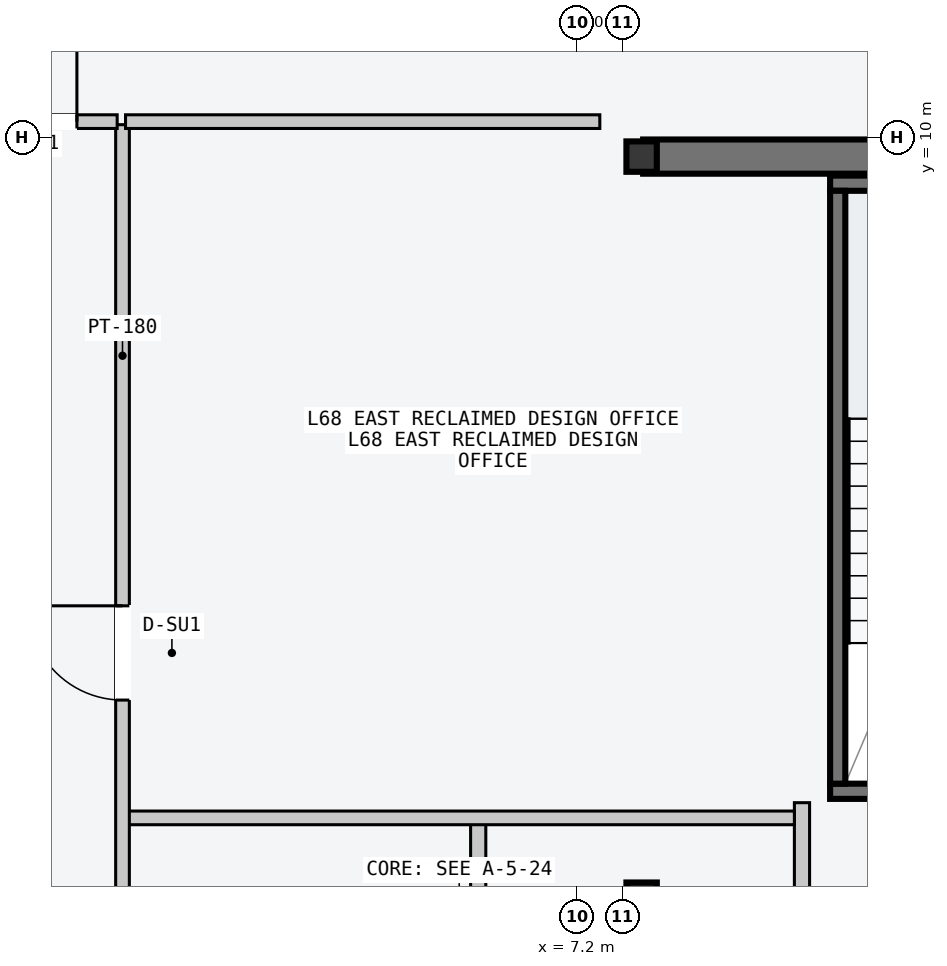
"""IFC4 building model, lengths in metres.
Left out: names, types, materials, properties, quantities, classifications, styles, units other than length and angle.
Written with IfcOpenShell. Run it as: python <this file> out.ifc"""

import sys

from ifc_helpers import new_model, si_unit, direction, frame, frame_2d, origin, origin_2d, place, context, subcontext, project, spatial, rectangle, i_section, extrude, element, fill, save


model = new_model("IFC4")
c1 = context("Model", 3, precision=1e-05, world=origin(), true_north=direction((0.0, 1.0)))
c2 = subcontext(c1, "Body", "Model", "MODEL_VIEW")
j1 = project(units=[si_unit("LENGTHUNIT", "METRE"), si_unit("PLANEANGLEUNIT", "RADIAN")], contexts=[c1])
p1 = place(None, origin())
s1 = spatial("IfcSite", under=j1, at=p1, CompositionType="ELEMENT")
p2 = place(p1, origin())
s2 = spatial("IfcBuilding", under=s1, at=p2, CompositionType="ELEMENT")
p3 = place(p2, frame((0.0, 0.0, 258.0)))
s3 = spatial("IfcBuildingStorey", under=s2, at=p3, CompositionType="ELEMENT", Elevation=258.0)
p4 = place(p3, frame((8.07, 9.75, -0.2), z_axis=(0.0, 0.0, 1.0), x_axis=(1.0, 0.0, 0.0)))
e1 = element("IfcWall", 1, at=p4, inside=s3, PredefinedType="SHEAR", context=c2, shape_type="SweptSolid", body=[
    extrude(rectangle(XDim=6.46, YDim=0.45, at=frame_2d((3.23, 0.0))), origin(), (0.0, 0.0, 1.0), 3.6),
])
p5 = place(p3, frame((10.53, 1.4, -0.2), z_axis=(0.0, 0.0, 1.0), x_axis=(1.0, 0.0, 0.0)))
e2 = element("IfcWall", 2, at=p5, inside=s3, PredefinedType="SOLIDWALL", context=c2, shape_type="SweptSolid", body=[
    extrude(rectangle(XDim=3.72, YDim=0.2, at=frame_2d((1.86, 0.0))), origin(), (0.0, 0.0, 1.0), 3.6),
])
p6 = place(p5, frame((1.5, 0.0, 0.2)))
e3 = element("IfcOpeningElement", 3, at=p6, cuts=e2, PredefinedType="OPENING", context=c2, shape_type="SweptSolid", body=[
    extrude(rectangle(XDim=1.12, YDim=2.18, at=frame_2d((0.56, 1.09))), frame((0.0, 0.11, 0.0), z_axis=(0.0, -1.0, 0.0), x_axis=(1.0, 0.0, 0.0)), (0.0, 0.0, 1.0), 0.22),
])
p7 = place(p3, frame((10.53, 9.4, -0.2), z_axis=(0.0, 0.0, 1.0), x_axis=(1.0, 0.0, 0.0)))
e4 = element("IfcWall", 4, at=p7, inside=s3, PredefinedType="SOLIDWALL", context=c2, shape_type="SweptSolid", body=[
    extrude(rectangle(XDim=3.72, YDim=0.2, at=frame_2d((1.86, 0.0))), origin(), (0.0, 0.0, 1.0), 3.6),
])
p8 = place(p3, frame((10.63, 1.5, -0.2), z_axis=(0.0, 0.0, 1.0), x_axis=(0.0, 1.0, 0.0)))
e5 = element("IfcWall", 5, at=p8, inside=s3, PredefinedType="SOLIDWALL", context=c2, shape_type="SweptSolid", body=[
    extrude(rectangle(XDim=7.8, YDim=0.2, at=frame_2d((3.9, 0.0))), origin(), (0.0, 0.0, 1.0), 3.6),
])
for number, where, z_axis, x_axis in (
    (6, (8.05, 0.0, 0.0), (0.0, 0.0, 1.0), (1.0, 0.0, 0.0)),
    (7, (8.05, 9.75, 0.0), (0.0, 0.0, 1.0), (1.0, 0.0, 0.0)),
):
    element("IfcColumn", number, at=place(p3, frame(where, z_axis=z_axis, x_axis=x_axis)), inside=s3, PredefinedType="COLUMN", context=c2, shape_type="SweptSolid", body=[
        extrude(i_section(OverallWidth=0.4, OverallDepth=0.4, WebThickness=0.013, FlangeThickness=0.021, at=origin_2d()), origin(), (0.0, 0.0, 1.0), 3.6),
    ])
p9 = place(p3, frame((5.9, -9.45, 0.0), z_axis=(0.0, 0.0, 1.0), x_axis=(0.0, 1.0, 0.0)))
e8 = element("IfcWall", 8, at=p9, inside=s3, PredefinedType="PARTITIONING", context=c2, shape_type="SweptSolid", body=[
    extrude(rectangle(XDim=10.5, YDim=0.2, at=frame_2d((5.25, 0.0))), origin(), (0.0, 0.0, 1.0), 3.4),
])
p10 = place(p9, frame((3.9, 0.0, 0.0)))
e9 = element("IfcOpeningElement", 9, at=p10, cuts=e8, PredefinedType="OPENING", context=c2, shape_type="SweptSolid", body=[
    extrude(rectangle(XDim=1.5, YDim=2.2, at=frame_2d((0.75, 1.1))), frame((0.0, 0.11, 0.0), z_axis=(0.0, -1.0, 0.0), x_axis=(1.0, 0.0, 0.0)), (0.0, 0.0, 1.0), 0.22),
])
p11 = place(p3, frame((10.16, -2.55, 0.0), z_axis=(0.0, 0.0, 1.0), x_axis=(0.0, 1.0, 0.0)))
e10 = element("IfcWall", 10, at=p11, inside=s3, PredefinedType="PARTITIONING", context=c2, shape_type="SweptSolid", body=[
    extrude(rectangle(XDim=3.8, YDim=0.2, at=frame_2d((1.9, 0.0))), origin(), (0.0, 0.0, 1.0), 3.4),
])
p12 = place(p11, frame((1.3, 0.0, 0.0)))
e11 = element("IfcOpeningElement", 11, at=p12, cuts=e10, PredefinedType="OPENING", context=c2, shape_type="SweptSolid", body=[
    extrude(rectangle(XDim=1.1, YDim=2.15, at=frame_2d((0.55, 1.075))), frame((0.0, 0.11, 0.0), z_axis=(0.0, -1.0, 0.0), x_axis=(1.0, 0.0, 0.0)), (0.0, 0.0, 1.0), 0.22),
])
p13 = place(p3, frame((1.26, 1.05, 0.0), z_axis=(0.0, 0.0, 1.0), x_axis=(1.0, 0.0, 0.0)))
e12 = element("IfcWall", 12, at=p13, inside=s3, PredefinedType="PARTITIONING", context=c2, shape_type="SweptSolid", body=[
    extrude(rectangle(XDim=8.8, YDim=0.18, at=frame_2d((4.4, 0.0))), origin(), (0.0, 0.0, 1.0), 3.4),
])
p14 = place(p3, frame((1.22, -3.5, 0.0), z_axis=(0.0, 0.0, 1.0), x_axis=(0.0, 1.0, 0.0)))
e13 = element("IfcWall", 13, at=p14, inside=s3, PredefinedType="PARTITIONING", context=c2, shape_type="SweptSolid", body=[
    extrude(rectangle(XDim=13.67, YDim=0.18, at=frame_2d((6.835, 0.0))), origin(), (0.0, 0.0, 1.0), 3.4),
])
p15 = place(p14, frame((6.1, 0.0, 0.0)))
e14 = element("IfcOpeningElement", 14, at=p15, cuts=e13, PredefinedType="OPENING", context=c2, shape_type="SweptSolid", body=[
    extrude(rectangle(XDim=1.24, YDim=2.24, at=frame_2d((0.62, 1.12))), frame((0.0, 0.1, 0.0), z_axis=(0.0, -1.0, 0.0), x_axis=(1.0, 0.0, 0.0)), (0.0, 0.0, 1.0), 0.2),
])
p16 = place(p14, frame((1.6, 0.0, 0.0)))
e15 = element("IfcOpeningElement", 15, at=p16, cuts=e13, PredefinedType="OPENING", context=c2, shape_type="SweptSolid", body=[
    extrude(rectangle(XDim=0.96, YDim=2.18, at=frame_2d((0.48, 1.09))), frame((0.0, 0.1, 0.0), z_axis=(0.0, -1.0, 0.0), x_axis=(1.0, 0.0, 0.0)), (0.0, 0.0, 1.0), 0.2),
])
p17 = place(p3, frame((1.26, 10.21, 0.0), z_axis=(0.0, 0.0, 1.0), x_axis=(1.0, 0.0, 0.0)))
e16 = element("IfcWall", 16, at=p17, inside=s3, PredefinedType="PARTITIONING", context=c2, shape_type="SweptSolid", body=[
    extrude(rectangle(XDim=6.24, YDim=0.18, at=frame_2d((3.12, 0.0))), origin(), (0.0, 0.0, 1.0), 3.4),
])
p18 = place(p3, frame((-1.15, 10.21, 0.0), z_axis=(0.0, 0.0, 1.0), x_axis=(1.0, 0.0, 0.0)))
e17 = element("IfcWall", 17, at=p18, inside=s3, PredefinedType="PARTITIONING", context=c2, shape_type="SweptSolid", body=[
    extrude(rectangle(XDim=2.3, YDim=0.18, at=frame_2d((1.15, 0.0))), origin(), (0.0, 0.0, 1.0), 3.4),
])
p19 = place(p18, frame((0.53, 0.0, 0.0)))
e18 = element("IfcOpeningElement", 18, at=p19, cuts=e17, PredefinedType="OPENING", context=c2, shape_type="SweptSolid", body=[
    extrude(rectangle(XDim=1.24, YDim=2.24, at=frame_2d((0.62, 1.12))), frame((0.0, 0.1, 0.0), z_axis=(0.0, -1.0, 0.0), x_axis=(1.0, 0.0, 0.0)), (0.0, 0.0, 1.0), 0.2),
])
p20 = place(p15, origin())
e19 = element("IfcDoor", 19, at=p20, inside=s3, OperationType="SINGLE_SWING_RIGHT", PredefinedType="DOOR", context=c2, shape_type="SweptSolid", body=[
    extrude(rectangle(XDim=1.24, YDim=2.24, at=frame_2d((0.62, 1.12))), frame((0.0, 0.025, 0.0), z_axis=(0.0, -1.0, 0.0), x_axis=(1.0, 0.0, 0.0)), (0.0, 0.0, 1.0), 0.05),
])
fill(e14, e19)
p21 = place(p19, origin())
e20 = element("IfcDoor", 20, at=p21, inside=s3, OperationType="SINGLE_SWING_RIGHT", PredefinedType="DOOR", context=c2, shape_type="SweptSolid", body=[
    extrude(rectangle(XDim=1.24, YDim=2.24, at=frame_2d((0.62, 1.12))), frame((0.0, 0.025, 0.0), z_axis=(0.0, -1.0, 0.0), x_axis=(1.0, 0.0, 0.0)), (0.0, 0.0, 1.0), 0.05),
])
fill(e18, e20)
save(model, sys.argv[1])
